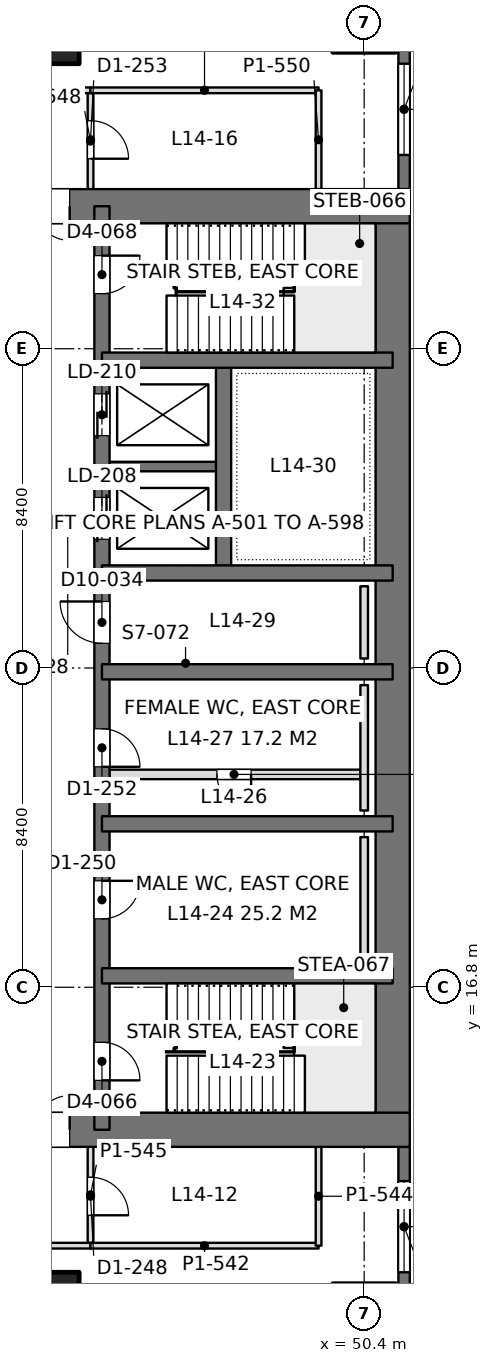
"""IFC4 building model, lengths in metres.
Left out: names, types, materials, properties, quantities, classifications, styles, units other than length and angle.
Written with IfcOpenShell. Run it as: python <this file> out.ifc"""

import sys

from ifc_helpers import new_model, si_unit, direction, frame, frame_2d, origin, origin_2d, place, context, subcontext, project, spatial, rectangle, extrude, element, fill, save


model = new_model("IFC4")
c1 = context("Model", 3, precision=1e-05, world=origin(), true_north=direction((0.0, 1.0)))
c2 = subcontext(c1, "Body", "Model", "MODEL_VIEW")
j1 = project(units=[si_unit("LENGTHUNIT", "METRE"), si_unit("PLANEANGLEUNIT", "RADIAN")], contexts=[c1])
p1 = place(None, origin())
s1 = spatial("IfcSite", under=j1, at=p1, CompositionType="ELEMENT")
p2 = place(p1, origin())
s2 = spatial("IfcBuilding", under=s1, at=p2, CompositionType="ELEMENT")
p3 = place(p2, frame((0.0, 0.0, 63.9)))
s3 = spatial("IfcBuildingStorey", under=s2, at=p3, CompositionType="ELEMENT", Elevation=63.9)
for number, where, z_axis, x_axis in (
    (1, (42.0, 8.4, 0.0), (0.0, 0.0, 1.0), (1.0, 0.0, 0.0)),
    (2, (42.0, 42.0, 0.0), (0.0, 0.0, 1.0), (1.0, 0.0, 0.0)),
):
    element("IfcColumn", number, at=place(p3, frame(where, z_axis=z_axis, x_axis=x_axis)), inside=s3, PredefinedType="COLUMN", context=c2, shape_type="SweptSolid", body=[
        extrude(rectangle(XDim=1.8, YDim=1.8, at=origin_2d()), origin(), (0.0, 0.0, 1.0), 4.5),
    ])
p4 = place(p3, frame((33.6, 13.05, 0.0), z_axis=(0.0, 0.0, 1.0), x_axis=(1.0, 0.0, 0.0)))
e3 = element("IfcWall", 3, at=p4, inside=s3, PredefinedType="SHEAR", context=c2, shape_type="SweptSolid", body=[
    extrude(rectangle(XDim=18.0, YDim=0.9, at=frame_2d((9.0, 0.0))), origin(), (0.0, 0.0, 1.0), 4.5),
])
p5 = place(p4, frame((7.25, 0.0, 0.0)))
e4 = element("IfcOpeningElement", 4, at=p5, cuts=e3, PredefinedType="OPENING", context=c2, shape_type="SweptSolid", body=[
    extrude(rectangle(XDim=1.8, YDim=2.4, at=frame_2d((0.9, 1.2))), frame((0.0, 0.46, 0.0), z_axis=(0.0, -1.0, 0.0), x_axis=(1.0, 0.0, 0.0)), (0.0, 0.0, 1.0), 0.92),
])
p6 = place(p3, frame((33.6, 37.35, 0.0), z_axis=(0.0, 0.0, 1.0), x_axis=(1.0, 0.0, 0.0)))
e5 = element("IfcWall", 5, at=p6, inside=s3, PredefinedType="SHEAR", context=c2, shape_type="SweptSolid", body=[
    extrude(rectangle(XDim=18.0, YDim=0.9, at=frame_2d((9.0, 0.0))), origin(), (0.0, 0.0, 1.0), 4.5),
])
p7 = place(p6, frame((7.25, 0.0, 0.0)))
e6 = element("IfcOpeningElement", 6, at=p7, cuts=e5, PredefinedType="OPENING", context=c2, shape_type="SweptSolid", body=[
    extrude(rectangle(XDim=1.8, YDim=2.4, at=frame_2d((0.9, 1.2))), frame((0.0, 0.46, 0.0), z_axis=(0.0, -1.0, 0.0), x_axis=(1.0, 0.0, 0.0)), (0.0, 0.0, 1.0), 0.92),
])
p8 = place(p3, frame((51.15, 13.05, 0.0), z_axis=(0.0, 0.0, 1.0), x_axis=(0.0, 1.0, 0.0)))
e7 = element("IfcWall", 7, at=p8, inside=s3, PredefinedType="SHEAR", context=c2, shape_type="SweptSolid", body=[
    extrude(rectangle(XDim=24.3, YDim=0.9, at=frame_2d((12.15, 0.0))), origin(), (0.0, 0.0, 1.0), 4.5),
])
p9 = place(p3, frame((43.5, 13.05, 0.0), z_axis=(0.0, 0.0, 1.0), x_axis=(0.0, 1.0, 0.0)))
e8 = element("IfcWall", 8, at=p9, inside=s3, PredefinedType="SHEAR", context=c2, shape_type="SweptSolid", body=[
    extrude(rectangle(XDim=24.3, YDim=0.4, at=frame_2d((12.15, 0.0))), origin(), (0.0, 0.0, 1.0), 4.5),
])
p10 = place(p9, frame((1.3, 0.0, 0.0)))
e9 = element("IfcOpeningElement", 9, at=p10, cuts=e8, PredefinedType="OPENING", context=c2, shape_type="SweptSolid", body=[
    extrude(rectangle(XDim=1.0, YDim=2.2, at=frame_2d((0.5, 1.1))), frame((0.0, 0.21, 0.0), z_axis=(0.0, -1.0, 0.0), x_axis=(1.0, 0.0, 0.0)), (0.0, 0.0, 1.0), 0.42),
])
p11 = place(p9, frame((22.0, 0.0, 0.0)))
e10 = element("IfcOpeningElement", 10, at=p11, cuts=e8, PredefinedType="OPENING", context=c2, shape_type="SweptSolid", body=[
    extrude(rectangle(XDim=1.0, YDim=2.2, at=frame_2d((0.5, 1.1))), frame((0.0, 0.21, 0.0), z_axis=(0.0, -1.0, 0.0), x_axis=(1.0, 0.0, 0.0)), (0.0, 0.0, 1.0), 0.42),
])
p12 = place(p9, frame((5.55, 0.0, 0.0)))
e11 = element("IfcOpeningElement", 11, at=p12, cuts=e8, PredefinedType="OPENING", context=c2, shape_type="SweptSolid", body=[
    extrude(rectangle(XDim=1.0, YDim=2.2, at=frame_2d((0.5, 1.1))), frame((0.0, 0.21, 0.0), z_axis=(0.0, -1.0, 0.0), x_axis=(1.0, 0.0, 0.0)), (0.0, 0.0, 1.0), 0.42),
])
p13 = place(p9, frame((9.55, 0.0, 0.0)))
e12 = element("IfcOpeningElement", 12, at=p13, cuts=e8, PredefinedType="OPENING", context=c2, shape_type="SweptSolid", body=[
    extrude(rectangle(XDim=1.0, YDim=2.2, at=frame_2d((0.5, 1.1))), frame((0.0, 0.21, 0.0), z_axis=(0.0, -1.0, 0.0), x_axis=(1.0, 0.0, 0.0)), (0.0, 0.0, 1.0), 0.42),
])
p14 = place(p9, frame((12.8, 0.0, 0.0)))
e13 = element("IfcOpeningElement", 13, at=p14, cuts=e8, PredefinedType="OPENING", context=c2, shape_type="SweptSolid", body=[
    extrude(rectangle(XDim=1.1, YDim=2.2, at=frame_2d((0.55, 1.1))), frame((0.0, 0.21, 0.0), z_axis=(0.0, -1.0, 0.0), x_axis=(1.0, 0.0, 0.0)), (0.0, 0.0, 1.0), 0.42),
])
p15 = place(p9, frame((15.538, 0.0, 0.0)))
e14 = element("IfcOpeningElement", 14, at=p15, cuts=e8, PredefinedType="OPENING", context=c2, shape_type="SweptSolid", body=[
    extrude(rectangle(XDim=1.1, YDim=2.2, at=frame_2d((0.55, 1.1))), frame((0.0, 0.21, 0.0), z_axis=(0.0, -1.0, 0.0), x_axis=(1.0, 0.0, 0.0)), (0.0, 0.0, 1.0), 0.42),
])
p16 = place(p9, frame((18.262, 0.0, 0.0)))
e15 = element("IfcOpeningElement", 15, at=p16, cuts=e8, PredefinedType="OPENING", context=c2, shape_type="SweptSolid", body=[
    extrude(rectangle(XDim=1.1, YDim=2.2, at=frame_2d((0.55, 1.1))), frame((0.0, 0.21, 0.0), z_axis=(0.0, -1.0, 0.0), x_axis=(1.0, 0.0, 0.0)), (0.0, 0.0, 1.0), 0.42),
])
for number, where, z_axis, x_axis in (
    (16, (51.15, 17.1, 0.0), (0.0, 0.0, 1.0), (-1.0, 0.0, 0.0)),
    (17, (51.15, 21.1, 0.0), (0.0, 0.0, 1.0), (-1.0, 0.0, 0.0)),
    (18, (51.15, 25.1, 0.0), (0.0, 0.0, 1.0), (-1.0, 0.0, 0.0)),
    (19, (51.15, 27.7, 0.0), (0.0, 0.0, 1.0), (-1.0, 0.0, 0.0)),
    (20, (51.15, 33.3, 0.0), (0.0, 0.0, 1.0), (-1.0, 0.0, 0.0)),
):
    element("IfcWall", number, at=place(p3, frame(where, z_axis=z_axis, x_axis=x_axis)), inside=s3, PredefinedType="SHEAR", context=c2, shape_type="SweptSolid", body=[
        extrude(rectangle(XDim=7.65, YDim=0.4, at=frame_2d((3.825, 0.0))), origin(), (0.0, 0.0, 1.0), 4.5),
    ])
p17 = place(p3, frame((46.7, 27.7, 0.0), z_axis=(0.0, 0.0, 1.0), x_axis=(0.0, 1.0, 0.0)))
e21 = element("IfcWall", 21, at=p17, inside=s3, PredefinedType="SHEAR", context=c2, shape_type="SweptSolid", body=[
    extrude(rectangle(XDim=5.6, YDim=0.4, at=frame_2d((2.8, 0.0))), origin(), (0.0, 0.0, 1.0), 4.5),
])
p18 = place(p3, frame((46.7, 30.5, 0.0), z_axis=(0.0, 0.0, 1.0), x_axis=(-1.0, 0.0, 0.0)))
e22 = element("IfcWall", 22, at=p18, inside=s3, PredefinedType="SHEAR", context=c2, shape_type="SweptSolid", body=[
    extrude(rectangle(XDim=3.2, YDim=0.25, at=frame_2d((1.6, 0.0))), origin(), (0.0, 0.0, 1.0), 4.5),
])
p19 = place(p3, frame((51.45, 42.0, 0.0), z_axis=(0.0, 0.0, 1.0), x_axis=(0.0, -1.0, 0.0)))
e23 = element("IfcWall", 23, at=p19, inside=s3, PredefinedType="SOLIDWALL", context=c2, shape_type="SweptSolid", body=[
    extrude(rectangle(XDim=4.2, YDim=0.3, at=frame_2d((2.1, 0.0))), origin(), (0.0, 0.0, 1.0), 4.34),
])
p20 = place(p19, frame((0.9, 0.0, 0.9)))
e24 = element("IfcOpeningElement", 24, at=p20, cuts=e23, PredefinedType="OPENING", context=c2, shape_type="SweptSolid", body=[
    extrude(rectangle(XDim=2.4, YDim=1.9, at=frame_2d((1.2, 0.95))), frame((0.0, 0.16, 0.0), z_axis=(0.0, -1.0, 0.0), x_axis=(1.0, 0.0, 0.0)), (0.0, 0.0, 1.0), 0.32),
])
p21 = place(p3, frame((51.45, 12.6, 0.0), z_axis=(0.0, 0.0, 1.0), x_axis=(0.0, -1.0, 0.0)))
e25 = element("IfcWall", 25, at=p21, inside=s3, PredefinedType="SOLIDWALL", context=c2, shape_type="SweptSolid", body=[
    extrude(rectangle(XDim=4.2, YDim=0.3, at=frame_2d((2.1, 0.0))), origin(), (0.0, 0.0, 1.0), 4.34),
])
p22 = place(p21, frame((0.9, 0.0, 0.9)))
e26 = element("IfcOpeningElement", 26, at=p22, cuts=e25, PredefinedType="OPENING", context=c2, shape_type="SweptSolid", body=[
    extrude(rectangle(XDim=2.4, YDim=1.9, at=frame_2d((1.2, 0.95))), frame((0.0, 0.16, 0.0), z_axis=(0.0, -1.0, 0.0), x_axis=(1.0, 0.0, 0.0)), (0.0, 0.0, 1.0), 0.32),
])
p23 = place(p3, frame((1.2, 10.0, 0.0), z_axis=(0.0, 0.0, 1.0), x_axis=(1.0, 0.0, 0.0)))
e27 = element("IfcWall", 27, at=p23, inside=s3, PredefinedType="PARTITIONING", context=c2, shape_type="SweptSolid", body=[
    extrude(rectangle(XDim=42.002, YDim=0.15, at=frame_2d((21.001, 0.0))), origin(), (0.0, 0.0, 1.0), 3.74),
])
p24 = place(p23, frame((2.1, 0.0, 0.0)))
e28 = element("IfcOpeningElement", 28, at=p24, cuts=e27, PredefinedType="OPENING", context=c2, shape_type="SweptSolid", body=[
    extrude(rectangle(XDim=1.8, YDim=2.2, at=frame_2d((0.9, 1.1))), frame((0.0, 0.085, 0.0), z_axis=(0.0, -1.0, 0.0), x_axis=(1.0, 0.0, 0.0)), (0.0, 0.0, 1.0), 0.17),
])
p25 = place(p23, frame((10.5, 0.0, 0.0)))
e29 = element("IfcOpeningElement", 29, at=p25, cuts=e27, PredefinedType="OPENING", context=c2, shape_type="SweptSolid", body=[
    extrude(rectangle(XDim=1.8, YDim=2.2, at=frame_2d((0.9, 1.1))), frame((0.0, 0.085, 0.0), z_axis=(0.0, -1.0, 0.0), x_axis=(1.0, 0.0, 0.0)), (0.0, 0.0, 1.0), 0.17),
])
p26 = place(p23, frame((18.9, 0.0, 0.0)))
e30 = element("IfcOpeningElement", 30, at=p26, cuts=e27, PredefinedType="OPENING", context=c2, shape_type="SweptSolid", body=[
    extrude(rectangle(XDim=1.8, YDim=2.2, at=frame_2d((0.9, 1.1))), frame((0.0, 0.085, 0.0), z_axis=(0.0, -1.0, 0.0), x_axis=(1.0, 0.0, 0.0)), (0.0, 0.0, 1.0), 0.17),
])
p27 = place(p23, frame((27.3, 0.0, 0.0)))
e31 = element("IfcOpeningElement", 31, at=p27, cuts=e27, PredefinedType="OPENING", context=c2, shape_type="SweptSolid", body=[
    extrude(rectangle(XDim=1.8, YDim=2.2, at=frame_2d((0.9, 1.1))), frame((0.0, 0.085, 0.0), z_axis=(0.0, -1.0, 0.0), x_axis=(1.0, 0.0, 0.0)), (0.0, 0.0, 1.0), 0.17),
])
p28 = place(p23, frame((35.7, 0.0, 0.0)))
e32 = element("IfcOpeningElement", 32, at=p28, cuts=e27, PredefinedType="OPENING", context=c2, shape_type="SweptSolid", body=[
    extrude(rectangle(XDim=1.8, YDim=2.2, at=frame_2d((0.9, 1.1))), frame((0.0, 0.085, 0.0), z_axis=(0.0, -1.0, 0.0), x_axis=(1.0, 0.0, 0.0)), (0.0, 0.0, 1.0), 0.17),
])
p29 = place(p3, frame((43.2, 10.074, 0.0), z_axis=(0.0, 0.0, 1.0), x_axis=(0.0, 1.0, 0.0)))
e33 = element("IfcWall", 33, at=p29, inside=s3, PredefinedType="PARTITIONING", context=c2, shape_type="SweptSolid", body=[
    extrude(rectangle(XDim=2.528, YDim=0.15, at=frame_2d((1.264, 0.0))), origin(), (0.0, 0.0, 1.0), 4.34),
])
p30 = place(p29, frame((0.726, 0.0, 0.0)))
e34 = element("IfcOpeningElement", 34, at=p30, cuts=e33, PredefinedType="OPENING", context=c2, shape_type="SweptSolid", body=[
    extrude(rectangle(XDim=1.0, YDim=2.2, at=frame_2d((0.5, 1.1))), frame((0.0, 0.085, 0.0), z_axis=(0.0, -1.0, 0.0), x_axis=(1.0, 0.0, 0.0)), (0.0, 0.0, 1.0), 0.17),
])
p31 = place(p3, frame((43.198, 10.0, 0.0), z_axis=(0.0, 0.0, 1.0), x_axis=(1.0, 0.0, 0.0)))
e35 = element("IfcWall", 35, at=p31, inside=s3, PredefinedType="PARTITIONING", context=c2, shape_type="SweptSolid", body=[
    extrude(rectangle(XDim=6.002, YDim=0.15, at=frame_2d((3.001, 0.0))), origin(), (0.0, 0.0, 1.0), 4.34),
])
p32 = place(p3, frame((49.2, 10.0, 0.0), z_axis=(0.0, 0.0, 1.0), x_axis=(0.0, 1.0, 0.0)))
e36 = element("IfcWall", 36, at=p32, inside=s3, PredefinedType="PARTITIONING", context=c2, shape_type="SweptSolid", body=[
    extrude(rectangle(XDim=2.602, YDim=0.15, at=frame_2d((1.301, 0.0))), origin(), (0.0, 0.0, 1.0), 4.34),
])
p33 = place(p3, frame((1.2, 40.4, 0.0), z_axis=(0.0, 0.0, 1.0), x_axis=(1.0, 0.0, 0.0)))
e37 = element("IfcWall", 37, at=p33, inside=s3, PredefinedType="PARTITIONING", context=c2, shape_type="SweptSolid", body=[
    extrude(rectangle(XDim=42.002, YDim=0.15, at=frame_2d((21.001, 0.0))), origin(), (0.0, 0.0, 1.0), 3.74),
])
p34 = place(p33, frame((2.1, 0.0, 0.0)))
e38 = element("IfcOpeningElement", 38, at=p34, cuts=e37, PredefinedType="OPENING", context=c2, shape_type="SweptSolid", body=[
    extrude(rectangle(XDim=1.8, YDim=2.2, at=frame_2d((0.9, 1.1))), frame((0.0, 0.085, 0.0), z_axis=(0.0, -1.0, 0.0), x_axis=(1.0, 0.0, 0.0)), (0.0, 0.0, 1.0), 0.17),
])
p35 = place(p33, frame((10.5, 0.0, 0.0)))
e39 = element("IfcOpeningElement", 39, at=p35, cuts=e37, PredefinedType="OPENING", context=c2, shape_type="SweptSolid", body=[
    extrude(rectangle(XDim=1.8, YDim=2.2, at=frame_2d((0.9, 1.1))), frame((0.0, 0.085, 0.0), z_axis=(0.0, -1.0, 0.0), x_axis=(1.0, 0.0, 0.0)), (0.0, 0.0, 1.0), 0.17),
])
p36 = place(p33, frame((18.9, 0.0, 0.0)))
e40 = element("IfcOpeningElement", 40, at=p36, cuts=e37, PredefinedType="OPENING", context=c2, shape_type="SweptSolid", body=[
    extrude(rectangle(XDim=1.8, YDim=2.2, at=frame_2d((0.9, 1.1))), frame((0.0, 0.085, 0.0), z_axis=(0.0, -1.0, 0.0), x_axis=(1.0, 0.0, 0.0)), (0.0, 0.0, 1.0), 0.17),
])
p37 = place(p33, frame((27.3, 0.0, 0.0)))
e41 = element("IfcOpeningElement", 41, at=p37, cuts=e37, PredefinedType="OPENING", context=c2, shape_type="SweptSolid", body=[
    extrude(rectangle(XDim=1.8, YDim=2.2, at=frame_2d((0.9, 1.1))), frame((0.0, 0.085, 0.0), z_axis=(0.0, -1.0, 0.0), x_axis=(1.0, 0.0, 0.0)), (0.0, 0.0, 1.0), 0.17),
])
p38 = place(p33, frame((35.7, 0.0, 0.0)))
e42 = element("IfcOpeningElement", 42, at=p38, cuts=e37, PredefinedType="OPENING", context=c2, shape_type="SweptSolid", body=[
    extrude(rectangle(XDim=1.8, YDim=2.2, at=frame_2d((0.9, 1.1))), frame((0.0, 0.085, 0.0), z_axis=(0.0, -1.0, 0.0), x_axis=(1.0, 0.0, 0.0)), (0.0, 0.0, 1.0), 0.17),
])
p39 = place(p3, frame((43.2, 37.8, 0.0), z_axis=(0.0, 0.0, 1.0), x_axis=(0.0, 1.0, 0.0)))
e43 = element("IfcWall", 43, at=p39, inside=s3, PredefinedType="PARTITIONING", context=c2, shape_type="SweptSolid", body=[
    extrude(rectangle(XDim=2.526, YDim=0.15, at=frame_2d((1.263, 0.0))), origin(), (0.0, 0.0, 1.0), 4.34),
])
p40 = place(p39, frame((0.8, 0.0, 0.0)))
e44 = element("IfcOpeningElement", 44, at=p40, cuts=e43, PredefinedType="OPENING", context=c2, shape_type="SweptSolid", body=[
    extrude(rectangle(XDim=1.0, YDim=2.2, at=frame_2d((0.5, 1.1))), frame((0.0, 0.085, 0.0), z_axis=(0.0, -1.0, 0.0), x_axis=(1.0, 0.0, 0.0)), (0.0, 0.0, 1.0), 0.17),
])
p41 = place(p3, frame((43.198, 40.4, 0.0), z_axis=(0.0, 0.0, 1.0), x_axis=(1.0, 0.0, 0.0)))
e45 = element("IfcWall", 45, at=p41, inside=s3, PredefinedType="PARTITIONING", context=c2, shape_type="SweptSolid", body=[
    extrude(rectangle(XDim=6.002, YDim=0.15, at=frame_2d((3.001, 0.0))), origin(), (0.0, 0.0, 1.0), 3.98),
])
p42 = place(p3, frame((49.2, 37.8, 0.0), z_axis=(0.0, 0.0, 1.0), x_axis=(0.0, 1.0, 0.0)))
e46 = element("IfcWall", 46, at=p42, inside=s3, PredefinedType="PARTITIONING", context=c2, shape_type="SweptSolid", body=[
    extrude(rectangle(XDim=2.6, YDim=0.15, at=frame_2d((1.3, 0.0))), origin(), (0.0, 0.0, 1.0), 4.34),
])
p43 = place(p3, frame((43.7, 22.4, 0.0), z_axis=(0.0, 0.0, 1.0), x_axis=(1.0, 0.0, 0.0)))
e47 = element("IfcWall", 47, at=p43, inside=s3, PredefinedType="PARTITIONING", context=c2, shape_type="SweptSolid", body=[
    extrude(rectangle(XDim=6.6, YDim=0.25, at=frame_2d((3.3, 0.0))), origin(), (0.0, 0.0, 1.0), 4.3),
])
p44 = place(p43, frame((2.825, 0.0, 0.0)))
e48 = element("IfcOpeningElement", 48, at=p44, cuts=e47, PredefinedType="OPENING", context=c2, shape_type="SweptSolid", body=[
    extrude(rectangle(XDim=0.9, YDim=2.2, at=frame_2d((0.45, 1.1))), frame((0.0, 0.135, 0.0), z_axis=(0.0, -1.0, 0.0), x_axis=(1.0, 0.0, 0.0)), (0.0, 0.0, 1.0), 0.27),
])
for number, where, z_axis, x_axis in (
    (49, (50.4, 17.45, 0.0), (0.0, 0.0, 1.0), (0.0, 1.0, 0.0)),
    (50, (50.4, 21.45, 0.0), (0.0, 0.0, 1.0), (0.0, 1.0, 0.0)),
):
    element("IfcWall", number, at=place(p3, frame(where, z_axis=z_axis, x_axis=x_axis)), inside=s3, PredefinedType="PLUMBINGWALL", context=c2, shape_type="SweptSolid", body=[
        extrude(rectangle(XDim=3.3, YDim=0.2, at=frame_2d((1.65, 0.0))), origin(), (0.0, 0.0, 1.0), 1.2),
    ])
p45 = place(p3, frame((50.4, 25.45, 0.0), z_axis=(0.0, 0.0, 1.0), x_axis=(0.0, 1.0, 0.0)))
e51 = element("IfcWall", 51, at=p45, inside=s3, PredefinedType="PLUMBINGWALL", context=c2, shape_type="SweptSolid", body=[
    extrude(rectangle(XDim=1.9, YDim=0.2, at=frame_2d((0.95, 0.0))), origin(), (0.0, 0.0, 1.0), 1.2),
])
p46 = place(p20, origin())
e52 = element("IfcWindow", 52, at=p46, inside=s3, PartitioningType="SINGLE_PANEL", PredefinedType="WINDOW", context=c2, shape_type="SweptSolid", body=[
    extrude(rectangle(XDim=2.4, YDim=1.9, at=frame_2d((1.2, 0.95))), frame((0.0, 0.03, 0.0), z_axis=(0.0, -1.0, 0.0), x_axis=(1.0, 0.0, 0.0)), (0.0, 0.0, 1.0), 0.06),
])
fill(e24, e52)
p47 = place(p22, origin())
e53 = element("IfcWindow", 53, at=p47, inside=s3, PartitioningType="SINGLE_PANEL", PredefinedType="WINDOW", context=c2, shape_type="SweptSolid", body=[
    extrude(rectangle(XDim=2.4, YDim=1.9, at=frame_2d((1.2, 0.95))), frame((0.0, 0.03, 0.0), z_axis=(0.0, -1.0, 0.0), x_axis=(1.0, 0.0, 0.0)), (0.0, 0.0, 1.0), 0.06),
])
fill(e26, e53)
p48 = place(p5, origin())
e54 = element("IfcDoor", 54, at=p48, inside=s3, OperationType="DOUBLE_DOOR_SINGLE_SWING", PredefinedType="DOOR", context=c2, shape_type="SweptSolid", body=[
    extrude(rectangle(XDim=1.8, YDim=2.4, at=frame_2d((0.9, 1.2))), frame((0.0, 0.025, 0.0), z_axis=(0.0, -1.0, 0.0), x_axis=(1.0, 0.0, 0.0)), (0.0, 0.0, 1.0), 0.05),
])
fill(e4, e54)
p49 = place(p7, frame((1.8, 0.0, 0.0), z_axis=(0.0, 0.0, 1.0), x_axis=(-1.0, 0.0, 0.0)))
e55 = element("IfcDoor", 55, at=p49, inside=s3, OperationType="DOUBLE_DOOR_SINGLE_SWING", PredefinedType="DOOR", context=c2, shape_type="SweptSolid", body=[
    extrude(rectangle(XDim=1.8, YDim=2.4, at=frame_2d((0.9, 1.2))), frame((0.0, 0.025, 0.0), z_axis=(0.0, -1.0, 0.0), x_axis=(1.0, 0.0, 0.0)), (0.0, 0.0, 1.0), 0.05),
])
fill(e6, e55)
p50 = place(p10, frame((1.0, 0.0, 0.0), z_axis=(0.0, 0.0, 1.0), x_axis=(-1.0, 0.0, 0.0)))
e56 = element("IfcDoor", 56, at=p50, inside=s3, OperationType="SINGLE_SWING_RIGHT", PredefinedType="DOOR", context=c2, shape_type="SweptSolid", body=[
    extrude(rectangle(XDim=1.0, YDim=2.2, at=frame_2d((0.5, 1.1))), frame((0.0, 0.025, 0.0), z_axis=(0.0, -1.0, 0.0), x_axis=(1.0, 0.0, 0.0)), (0.0, 0.0, 1.0), 0.05),
])
fill(e9, e56)
p51 = place(p11, frame((1.0, 0.0, 0.0), z_axis=(0.0, 0.0, 1.0), x_axis=(-1.0, 0.0, 0.0)))
e57 = element("IfcDoor", 57, at=p51, inside=s3, OperationType="SINGLE_SWING_LEFT", PredefinedType="DOOR", context=c2, shape_type="SweptSolid", body=[
    extrude(rectangle(XDim=1.0, YDim=2.2, at=frame_2d((0.5, 1.1))), frame((0.0, 0.025, 0.0), z_axis=(0.0, -1.0, 0.0), x_axis=(1.0, 0.0, 0.0)), (0.0, 0.0, 1.0), 0.05),
])
fill(e10, e57)
p52 = place(p12, frame((1.0, 0.0, 0.0), z_axis=(0.0, 0.0, 1.0), x_axis=(-1.0, 0.0, 0.0)))
e58 = element("IfcDoor", 58, at=p52, inside=s3, OperationType="SINGLE_SWING_LEFT", PredefinedType="DOOR", context=c2, shape_type="SweptSolid", body=[
    extrude(rectangle(XDim=1.0, YDim=2.2, at=frame_2d((0.5, 1.1))), frame((0.0, 0.025, 0.0), z_axis=(0.0, -1.0, 0.0), x_axis=(1.0, 0.0, 0.0)), (0.0, 0.0, 1.0), 0.05),
])
fill(e11, e58)
p53 = place(p13, frame((1.0, 0.0, 0.0), z_axis=(0.0, 0.0, 1.0), x_axis=(-1.0, 0.0, 0.0)))
e59 = element("IfcDoor", 59, at=p53, inside=s3, OperationType="SINGLE_SWING_RIGHT", PredefinedType="DOOR", context=c2, shape_type="SweptSolid", body=[
    extrude(rectangle(XDim=1.0, YDim=2.2, at=frame_2d((0.5, 1.1))), frame((0.0, 0.025, 0.0), z_axis=(0.0, -1.0, 0.0), x_axis=(1.0, 0.0, 0.0)), (0.0, 0.0, 1.0), 0.05),
])
fill(e12, e59)
p54 = place(p14, origin())
e60 = element("IfcDoor", 60, at=p54, inside=s3, OperationType="SINGLE_SWING_RIGHT", PredefinedType="DOOR", context=c2, shape_type="SweptSolid", body=[
    extrude(rectangle(XDim=1.1, YDim=2.2, at=frame_2d((0.55, 1.1))), frame((0.0, 0.025, 0.0), z_axis=(0.0, -1.0, 0.0), x_axis=(1.0, 0.0, 0.0)), (0.0, 0.0, 1.0), 0.05),
])
fill(e13, e60)
p55 = place(p15, origin())
e61 = element("IfcDoor", 61, at=p55, inside=s3, OperationType="DOUBLE_DOOR_SLIDING", PredefinedType="DOOR", context=c2, shape_type="SweptSolid", body=[
    extrude(rectangle(XDim=1.1, YDim=2.2, at=frame_2d((0.55, 1.1))), frame((0.0, 0.025, 0.0), z_axis=(0.0, -1.0, 0.0), x_axis=(1.0, 0.0, 0.0)), (0.0, 0.0, 1.0), 0.05),
])
fill(e14, e61)
p56 = place(p16, origin())
e62 = element("IfcDoor", 62, at=p56, inside=s3, OperationType="DOUBLE_DOOR_SLIDING", PredefinedType="DOOR", context=c2, shape_type="SweptSolid", body=[
    extrude(rectangle(XDim=1.1, YDim=2.2, at=frame_2d((0.55, 1.1))), frame((0.0, 0.025, 0.0), z_axis=(0.0, -1.0, 0.0), x_axis=(1.0, 0.0, 0.0)), (0.0, 0.0, 1.0), 0.05),
])
fill(e15, e62)
p57 = place(p30, frame((1.0, 0.0, 0.0), z_axis=(0.0, 0.0, 1.0), x_axis=(-1.0, 0.0, 0.0)))
e63 = element("IfcDoor", 63, at=p57, inside=s3, OperationType="SINGLE_SWING_RIGHT", PredefinedType="DOOR", context=c2, shape_type="SweptSolid", body=[
    extrude(rectangle(XDim=1.0, YDim=2.2, at=frame_2d((0.5, 1.1))), frame((0.0, 0.025, 0.0), z_axis=(0.0, -1.0, 0.0), x_axis=(1.0, 0.0, 0.0)), (0.0, 0.0, 1.0), 0.05),
])
fill(e34, e63)
p58 = place(p40, frame((1.0, 0.0, 0.0), z_axis=(0.0, 0.0, 1.0), x_axis=(-1.0, 0.0, 0.0)))
e64 = element("IfcDoor", 64, at=p58, inside=s3, OperationType="SINGLE_SWING_RIGHT", PredefinedType="DOOR", context=c2, shape_type="SweptSolid", body=[
    extrude(rectangle(XDim=1.0, YDim=2.2, at=frame_2d((0.5, 1.1))), frame((0.0, 0.025, 0.0), z_axis=(0.0, -1.0, 0.0), x_axis=(1.0, 0.0, 0.0)), (0.0, 0.0, 1.0), 0.05),
])
fill(e44, e64)
p59 = place(p44, frame((0.9, 0.0, 0.0), z_axis=(0.0, 0.0, 1.0), x_axis=(-1.0, 0.0, 0.0)))
e65 = element("IfcDoor", 65, at=p59, inside=s3, OperationType="SINGLE_SWING_LEFT", PredefinedType="DOOR", context=c2, shape_type="SweptSolid", body=[
    extrude(rectangle(XDim=0.9, YDim=2.2, at=frame_2d((0.45, 1.1))), frame((0.0, 0.025, 0.0), z_axis=(0.0, -1.0, 0.0), x_axis=(1.0, 0.0, 0.0)), (0.0, 0.0, 1.0), 0.05),
])
fill(e48, e65)
save(model, sys.argv[1])
